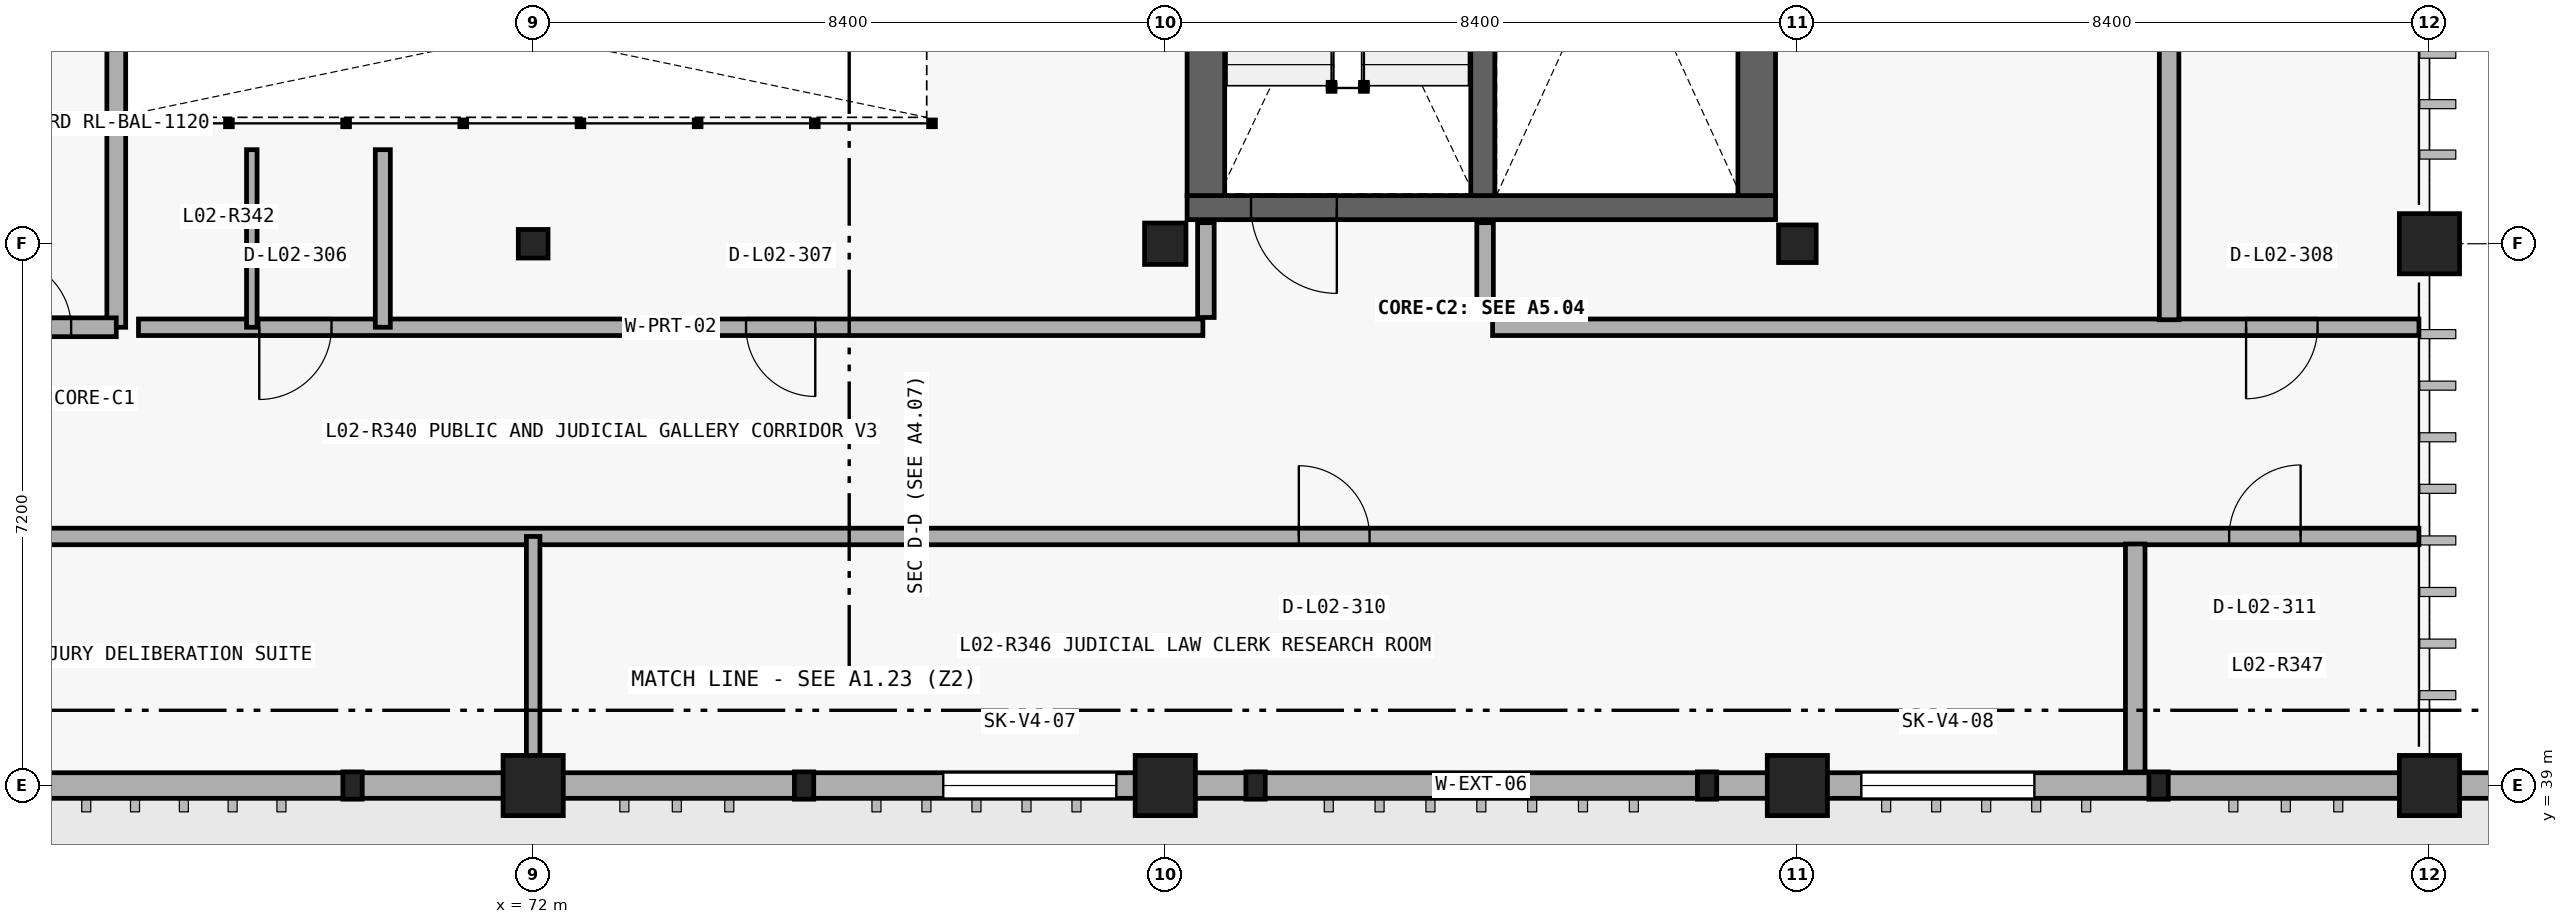
"""IFC4 building model, lengths in metres.
Left out: names, types, materials, properties, quantities, classifications, styles, units other than length and angle.
Written with IfcOpenShell. Run it as: python <this file> out.ifc"""

import sys

from ifc_helpers import new_model, si_unit, direction, frame, frame_2d, origin_with_axes, origin_2d_with_axis, place, context, subcontext, project, spatial, rectangle, circle, i_section, extrude, element, fill, save


model = new_model("IFC4")
c1 = context("Model", 3, precision=1e-05, world=origin_with_axes(), true_north=direction((0.0, 1.0)))
c2 = subcontext(c1, "Body", "Model", "MODEL_VIEW")
j1 = project(units=[si_unit("LENGTHUNIT", "METRE"), si_unit("PLANEANGLEUNIT", "RADIAN")], contexts=[c1])
p1 = place(None, origin_with_axes())
s1 = spatial("IfcSite", under=j1, at=p1, CompositionType="ELEMENT")
p2 = place(p1, origin_with_axes())
s2 = spatial("IfcBuilding", under=s1, at=p2, CompositionType="ELEMENT")
p3 = place(p2, frame((0.0, 0.0, 10.8), z_axis=(0.0, 0.0, 1.0), x_axis=(1.0, 0.0, 0.0)))
s3 = spatial("IfcBuildingStorey", under=s2, at=p3, CompositionType="ELEMENT", Elevation=10.8)
p4 = place(None, frame((64.5, 39.0, 10.48), z_axis=(0.0, 0.0, 1.0), x_axis=(1.0, 0.0, 0.0)))
e1 = element("IfcWall", 1, at=p4, inside=s3, PredefinedType="SOLIDWALL", context=c2, shape_type="SweptSolid", body=[
    extrude(rectangle(XDim=40.2, YDim=0.34, at=frame_2d((20.1, 0.0), x_axis=(1.0, 0.0))), origin_with_axes(), (0.0, 0.0, 1.0), 2.22),
])
p5 = place(None, frame((78.6, 39.0, 11.08), z_axis=(0.0, 0.0, 1.0), x_axis=(1.0, 0.0, 0.0)))
e2 = element("IfcOpeningElement", 2, at=p5, cuts=e1, PredefinedType="OPENING", context=c2, shape_type="SweptSolid", body=[
    extrude(rectangle(XDim=2.3, YDim=1.25, at=frame_2d((0.0, 0.625), x_axis=(1.0, 0.0))), frame((0.0, 0.18, 0.0), z_axis=(0.0, -1.0, 0.0), x_axis=(1.0, 0.0, 0.0)), (0.0, 0.0, 1.0), 0.36),
])
p6 = place(None, frame((90.8, 39.0, 11.08), z_axis=(0.0, 0.0, 1.0), x_axis=(1.0, 0.0, 0.0)))
e3 = element("IfcOpeningElement", 3, at=p6, cuts=e1, PredefinedType="OPENING", context=c2, shape_type="SweptSolid", body=[
    extrude(rectangle(XDim=2.3, YDim=1.25, at=frame_2d((0.0, 0.625), x_axis=(1.0, 0.0))), frame((0.0, 0.18, 0.0), z_axis=(0.0, -1.0, 0.0), x_axis=(1.0, 0.0, 0.0)), (0.0, 0.0, 1.0), 0.36),
])
p7 = place(None, frame((66.46, 45.09, 10.8), z_axis=(0.0, 0.0, 1.0), x_axis=(0.0, 1.0, 0.0)))
e4 = element("IfcWall", 4, at=p7, inside=s3, PredefinedType="PARTITIONING", context=c2, shape_type="SweptSolid", body=[
    extrude(rectangle(XDim=9.03, YDim=0.25, at=frame_2d((4.515, 0.0), x_axis=(1.0, 0.0))), origin_with_axes(), (0.0, 0.0, 1.0), 4.44),
])
p8 = place(None, frame((63.1, 45.09, 10.8), z_axis=(0.0, 0.0, 1.0), x_axis=(1.0, 0.0, 0.0)))
e5 = element("IfcWall", 5, at=p8, inside=s3, PredefinedType="PARTITIONING", context=c2, shape_type="SweptSolid", body=[
    extrude(rectangle(XDim=3.36, YDim=0.25, at=frame_2d((1.68, 0.0), x_axis=(1.0, 0.0))), origin_with_axes(), (0.0, 0.0, 1.0), 4.44),
])
p9 = place(None, frame((65.405, 45.09, 10.8), z_axis=(0.0, 0.0, 1.0), x_axis=(1.0, 0.0, 0.0)))
e6 = element("IfcOpeningElement", 6, at=p9, cuts=e5, PredefinedType="OPENING", context=c2, shape_type="SweptSolid", body=[
    extrude(rectangle(XDim=0.91, YDim=2.12, at=frame_2d((0.0, 1.06), x_axis=(1.0, 0.0))), frame((0.0, 0.135, 0.0), z_axis=(0.0, -1.0, 0.0), x_axis=(1.0, 0.0, 0.0)), (0.0, 0.0, 1.0), 0.27),
])
p10 = place(None, frame((80.69, 46.68, 10.8), z_axis=(0.0, 0.0, 1.0), x_axis=(1.0, 0.0, 0.0)))
e7 = element("IfcWall", 7, at=p10, inside=s3, PredefinedType="SHEAR", context=c2, shape_type="SweptSolid", body=[
    extrude(rectangle(XDim=7.82, YDim=0.32, at=frame_2d((3.91, 0.0), x_axis=(1.0, 0.0))), origin_with_axes(), (0.0, 0.0, 1.0), 4.8),
])
p11 = place(None, frame((82.11, 46.68, 10.8), z_axis=(0.0, 0.0, 1.0), x_axis=(1.0, 0.0, 0.0)))
e8 = element("IfcOpeningElement", 8, at=p11, cuts=e7, PredefinedType="OPENING", context=c2, shape_type="SweptSolid", body=[
    extrude(rectangle(XDim=1.14, YDim=2.18, at=frame_2d((0.0, 1.09), x_axis=(1.0, 0.0))), frame((0.0, 0.17, 0.0), z_axis=(0.0, -1.0, 0.0), x_axis=(1.0, 0.0, 0.0)), (0.0, 0.0, 1.0), 0.34),
])
for number, where, z_axis, x_axis in (
    (9, (88.26, 46.84, 10.8), (0.0, 0.0, 1.0), (0.0, 1.0, 0.0)),
    (10, (80.94, 53.96, 10.8), (0.0, 0.0, 1.0), (0.0, -1.0, 0.0)),
):
    element("IfcWall", number, at=place(None, frame(where, z_axis=z_axis, x_axis=x_axis)), inside=s3, PredefinedType="SHEAR", context=c2, shape_type="SweptSolid", body=[
        extrude(rectangle(XDim=7.12, YDim=0.5, at=frame_2d((3.56, 0.0), x_axis=(1.0, 0.0))), origin_with_axes(), (0.0, 0.0, 1.0), 4.8),
    ])
p12 = place(None, frame((84.62, 46.84, 10.8), z_axis=(0.0, 0.0, 1.0), x_axis=(0.0, 1.0, 0.0)))
e11 = element("IfcWall", 11, at=p12, inside=s3, PredefinedType="SHEAR", context=c2, shape_type="SweptSolid", body=[
    extrude(rectangle(XDim=7.12, YDim=0.32, at=frame_2d((3.56, 0.0), x_axis=(1.0, 0.0))), origin_with_axes(), (0.0, 0.0, 1.0), 4.8),
])
for number, where, z_axis, x_axis in (
    (12, (80.94, 45.22, 10.8), (0.0, 0.0, 1.0), (0.0, 1.0, 0.0)),
    (13, (84.65, 45.22, 10.8), (0.0, 0.0, 1.0), (0.0, 1.0, 0.0)),
):
    element("IfcWall", number, at=place(None, frame(where, z_axis=z_axis, x_axis=x_axis)), inside=s3, PredefinedType="PARTITIONING", context=c2, shape_type="SweptSolid", body=[
        extrude(rectangle(XDim=1.26, YDim=0.22, at=frame_2d((0.63, 0.0), x_axis=(1.0, 0.0))), origin_with_axes(), (0.0, 0.0, 1.0), 4.44),
    ])
p13 = place(None, frame((66.755, 45.09, 10.8), z_axis=(0.0, 0.0, 1.0), x_axis=(1.0, 0.0, 0.0)))
e14 = element("IfcWall", 14, at=p13, inside=s3, PredefinedType="PARTITIONING", context=c2, shape_type="SweptSolid", body=[
    extrude(rectangle(XDim=14.145, YDim=0.22, at=frame_2d((7.072, 0.0), x_axis=(1.0, 0.0))), origin_with_axes(), (0.0, 0.0, 1.0), 4.44),
])
p14 = place(None, frame((68.84, 45.09, 10.8), z_axis=(0.0, 0.0, 1.0), x_axis=(1.0, 0.0, 0.0)))
e15 = element("IfcOpeningElement", 15, at=p14, cuts=e14, PredefinedType="OPENING", context=c2, shape_type="SweptSolid", body=[
    extrude(rectangle(XDim=0.96, YDim=2.2, at=frame_2d((0.0, 1.1), x_axis=(1.0, 0.0))), frame((0.0, 0.12, 0.0), z_axis=(0.0, -1.0, 0.0), x_axis=(1.0, 0.0, 0.0)), (0.0, 0.0, 1.0), 0.24),
])
p15 = place(None, frame((75.289, 45.09, 10.8), z_axis=(0.0, 0.0, 1.0), x_axis=(1.0, 0.0, 0.0)))
e16 = element("IfcOpeningElement", 16, at=p15, cuts=e14, PredefinedType="OPENING", context=c2, shape_type="SweptSolid", body=[
    extrude(rectangle(XDim=0.92, YDim=2.14, at=frame_2d((0.0, 1.07), x_axis=(1.0, 0.0))), frame((0.0, 0.12, 0.0), z_axis=(0.0, -1.0, 0.0), x_axis=(1.0, 0.0, 0.0)), (0.0, 0.0, 1.0), 0.24),
])
p16 = place(None, frame((84.75, 45.09, 10.8), z_axis=(0.0, 0.0, 1.0), x_axis=(1.0, 0.0, 0.0)))
e17 = element("IfcWall", 17, at=p16, inside=s3, PredefinedType="PARTITIONING", context=c2, shape_type="SweptSolid", body=[
    extrude(rectangle(XDim=12.31, YDim=0.22, at=frame_2d((6.155, 0.0), x_axis=(1.0, 0.0))), origin_with_axes(), (0.0, 0.0, 1.0), 4.44),
])
p17 = place(None, frame((95.238, 45.09, 10.8), z_axis=(0.0, 0.0, 1.0), x_axis=(1.0, 0.0, 0.0)))
e18 = element("IfcOpeningElement", 18, at=p17, cuts=e17, PredefinedType="OPENING", context=c2, shape_type="SweptSolid", body=[
    extrude(rectangle(XDim=0.95, YDim=2.1, at=frame_2d((0.0, 1.05), x_axis=(1.0, 0.0))), frame((0.0, 0.12, 0.0), z_axis=(0.0, -1.0, 0.0), x_axis=(1.0, 0.0, 0.0)), (0.0, 0.0, 1.0), 0.24),
])
p18 = place(None, frame((46.956, 42.31, 10.8), z_axis=(0.0, 0.0, 1.0), x_axis=(1.0, 0.0, 0.0)))
e19 = element("IfcWall", 19, at=p18, inside=s3, PredefinedType="PARTITIONING", context=c2, shape_type="SweptSolid", body=[
    extrude(rectangle(XDim=50.104, YDim=0.22, at=frame_2d((25.052, 0.0), x_axis=(1.0, 0.0))), origin_with_axes(), (0.0, 0.0, 1.0), 4.44),
])
p19 = place(None, frame((59.64, 42.31, 10.8), z_axis=(0.0, 0.0, 1.0), x_axis=(1.0, 0.0, 0.0)))
e20 = element("IfcOpeningElement", 20, at=p19, cuts=e19, PredefinedType="OPENING", context=c2, shape_type="SweptSolid", body=[
    extrude(rectangle(XDim=0.99, YDim=2.22, at=frame_2d((0.0, 1.11), x_axis=(1.0, 0.0))), frame((0.0, 0.12, 0.0), z_axis=(0.0, -1.0, 0.0), x_axis=(1.0, 0.0, 0.0)), (0.0, 0.0, 1.0), 0.24),
])
p20 = place(None, frame((82.645, 42.31, 10.8), z_axis=(0.0, 0.0, 1.0), x_axis=(1.0, 0.0, 0.0)))
e21 = element("IfcOpeningElement", 21, at=p20, cuts=e19, PredefinedType="OPENING", context=c2, shape_type="SweptSolid", body=[
    extrude(rectangle(XDim=0.94, YDim=2.3, at=frame_2d((0.0, 1.15), x_axis=(1.0, 0.0))), frame((0.0, 0.12, 0.0), z_axis=(0.0, -1.0, 0.0), x_axis=(1.0, 0.0, 0.0)), (0.0, 0.0, 1.0), 0.24),
])
p21 = place(None, frame((95.013, 42.31, 10.8), z_axis=(0.0, 0.0, 1.0), x_axis=(1.0, 0.0, 0.0)))
e22 = element("IfcOpeningElement", 22, at=p21, cuts=e19, PredefinedType="OPENING", context=c2, shape_type="SweptSolid", body=[
    extrude(rectangle(XDim=0.95, YDim=2.1, at=frame_2d((0.0, 1.05), x_axis=(1.0, 0.0))), frame((0.0, 0.12, 0.0), z_axis=(0.0, -1.0, 0.0), x_axis=(1.0, 0.0, 0.0)), (0.0, 0.0, 1.0), 0.24),
])
p22 = place(None, frame((93.74, 45.19, 10.8), z_axis=(0.0, 0.0, 1.0), x_axis=(0.0, 1.0, 0.0)))
e23 = element("IfcWall", 23, at=p22, inside=s3, PredefinedType="PLUMBINGWALL", context=c2, shape_type="SweptSolid", body=[
    extrude(rectangle(XDim=16.43, YDim=0.26, at=frame_2d((8.215, 0.0), x_axis=(1.0, 0.0))), origin_with_axes(), (0.0, 0.0, 1.0), 4.44),
])
p23 = place(None, frame((93.29, 39.18, 10.8), z_axis=(0.0, 0.0, 1.0), x_axis=(0.0, 1.0, 0.0)))
e24 = element("IfcWall", 24, at=p23, inside=s3, PredefinedType="PLUMBINGWALL", context=c2, shape_type="SweptSolid", body=[
    extrude(rectangle(XDim=3.03, YDim=0.26, at=frame_2d((1.515, 0.0), x_axis=(1.0, 0.0))), origin_with_axes(), (0.0, 0.0, 1.0), 4.44),
])
p24 = place(None, frame((68.261, 45.09, 10.8), z_axis=(0.0, 0.0, 1.0), x_axis=(0.0, 1.0, 0.0)))
e25 = element("IfcWall", 25, at=p24, inside=s3, PredefinedType="PARTITIONING", context=c2, shape_type="SweptSolid", body=[
    extrude(rectangle(XDim=2.36, YDim=0.14, at=frame_2d((1.18, 0.0), x_axis=(1.0, 0.0))), origin_with_axes(), (0.0, 0.0, 1.0), 4.44),
])
p25 = place(None, frame((70.002, 45.09, 10.8), z_axis=(0.0, 0.0, 1.0), x_axis=(0.0, 1.0, 0.0)))
e26 = element("IfcWall", 26, at=p25, inside=s3, PredefinedType="PARTITIONING", context=c2, shape_type="SweptSolid", body=[
    extrude(rectangle(XDim=2.36, YDim=0.2, at=frame_2d((1.18, 0.0), x_axis=(1.0, 0.0))), origin_with_axes(), (0.0, 0.0, 1.0), 4.44),
])
p26 = place(None, frame((72.0, 39.14, 10.8), z_axis=(0.0, 0.0, 1.0), x_axis=(0.0, 1.0, 0.0)))
e27 = element("IfcWall", 27, at=p26, inside=s3, PredefinedType="PARTITIONING", context=c2, shape_type="SweptSolid", body=[
    extrude(rectangle(XDim=3.17, YDim=0.18, at=frame_2d((1.585, 0.0), x_axis=(1.0, 0.0))), origin_with_axes(), (0.0, 0.0, 1.0), 3.664),
])
p27 = place(None, frame((72.0, 39.0, 10.8), z_axis=(0.0, 0.0, 1.0), x_axis=(1.0, 0.0, 0.0)))
e28 = element("IfcColumn", 28, at=p27, inside=s3, PredefinedType="COLUMN", context=c2, shape_type="SweptSolid", body=[
    extrude(circle(Radius=0.4, at=origin_2d_with_axis()), origin_with_axes(), (0.0, 0.0, 1.0), 4.8),
])
p28 = place(None, frame((72.0, 46.2, 10.8), z_axis=(0.0, 0.0, 1.0), x_axis=(1.0, 0.0, 0.0)))
e29 = element("IfcColumn", 29, at=p28, inside=s3, PredefinedType="COLUMN", context=c2, shape_type="SweptSolid", body=[
    extrude(i_section(OverallWidth=0.395, OverallDepth=0.38, WebThickness=0.019, FlangeThickness=0.03, at=origin_2d_with_axis()), origin_with_axes(), (0.0, 0.0, 1.0), 4.8),
])
p29 = place(None, frame((80.4, 39.0, 10.8), z_axis=(0.0, 0.0, 1.0), x_axis=(1.0, 0.0, 0.0)))
e30 = element("IfcColumn", 30, at=p29, inside=s3, PredefinedType="COLUMN", context=c2, shape_type="SweptSolid", body=[
    extrude(circle(Radius=0.4, at=origin_2d_with_axis()), origin_with_axes(), (0.0, 0.0, 1.0), 4.8),
])
p30 = place(None, frame((80.4, 46.2, 10.8), z_axis=(0.0, 0.0, 1.0), x_axis=(1.0, 0.0, 0.0)))
e31 = element("IfcColumn", 31, at=p30, inside=s3, PredefinedType="COLUMN", context=c2, shape_type="SweptSolid", body=[
    extrude(i_section(OverallWidth=0.55, OverallDepth=0.55, WebThickness=0.025, FlangeThickness=0.042, at=origin_2d_with_axis()), origin_with_axes(), (0.0, 0.0, 1.0), 4.8),
])
p31 = place(None, frame((88.8, 39.0, 10.8), z_axis=(0.0, 0.0, 1.0), x_axis=(1.0, 0.0, 0.0)))
e32 = element("IfcColumn", 32, at=p31, inside=s3, PredefinedType="COLUMN", context=c2, shape_type="SweptSolid", body=[
    extrude(circle(Radius=0.4, at=origin_2d_with_axis()), origin_with_axes(), (0.0, 0.0, 1.0), 4.8),
])
p32 = place(None, frame((88.8, 46.2, 10.8), z_axis=(0.0, 0.0, 1.0), x_axis=(1.0, 0.0, 0.0)))
e33 = element("IfcColumn", 33, at=p32, inside=s3, PredefinedType="COLUMN", context=c2, shape_type="SweptSolid", body=[
    extrude(i_section(OverallWidth=0.5, OverallDepth=0.5, WebThickness=0.022, FlangeThickness=0.036, at=origin_2d_with_axis()), origin_with_axes(), (0.0, 0.0, 1.0), 4.8),
])
for number, where, z_axis, x_axis in (
    (34, (97.2, 39.0, 10.8), (0.0, 0.0, 1.0), (1.0, 0.0, 0.0)),
    (35, (97.2, 46.2, 10.8), (0.0, 0.0, 1.0), (1.0, 0.0, 0.0)),
):
    element("IfcColumn", number, at=place(None, frame(where, z_axis=z_axis, x_axis=x_axis)), inside=s3, PredefinedType="COLUMN", context=c2, shape_type="SweptSolid", body=[
        extrude(circle(Radius=0.4, at=origin_2d_with_axis()), origin_with_axes(), (0.0, 0.0, 1.0), 4.8),
    ])
p33 = place(None, frame((69.6, 39.0, 10.48), z_axis=(0.0, 0.0, 1.0), x_axis=(1.0, 0.0, 0.0)))
e36 = element("IfcColumn", 36, at=p33, inside=s3, PredefinedType="COLUMN", context=c2, shape_type="SweptSolid", body=[
    extrude(i_section(OverallWidth=0.257, OverallDepth=0.363, WebThickness=0.013, FlangeThickness=0.022, at=origin_2d_with_axis()), origin_with_axes(), (0.0, 0.0, 1.0), 2.02),
])
for number, where, z_axis, x_axis in (
    (37, (75.6, 39.0, 10.56), (0.0, 0.0, 1.0), (1.0, 0.0, 0.0)),
    (38, (81.6, 39.0, 10.56), (0.0, 0.0, 1.0), (1.0, 0.0, 0.0)),
    (39, (87.6, 39.0, 10.56), (0.0, 0.0, 1.0), (1.0, 0.0, 0.0)),
    (40, (93.6, 39.0, 10.56), (0.0, 0.0, 1.0), (1.0, 0.0, 0.0)),
):
    element("IfcColumn", number, at=place(None, frame(where, z_axis=z_axis, x_axis=x_axis)), inside=s3, PredefinedType="COLUMN", context=c2, shape_type="SweptSolid", body=[
        extrude(i_section(OverallWidth=0.257, OverallDepth=0.363, WebThickness=0.013, FlangeThickness=0.022, at=origin_2d_with_axis()), origin_with_axes(), (0.0, 0.0, 1.0), 1.94),
    ])
p34 = place(None, frame((65.405, 45.09, 10.8), z_axis=(0.0, 0.0, 1.0), x_axis=(1.0, 0.0, 0.0)))
e41 = element("IfcDoor", 41, at=p34, inside=s3, OperationType="SINGLE_SWING_LEFT", PredefinedType="DOOR", context=c2, shape_type="SweptSolid", body=[
    extrude(rectangle(XDim=0.91, YDim=2.12, at=frame_2d((0.0, 1.06), x_axis=(1.0, 0.0))), frame((0.0, 0.04, 0.0), z_axis=(0.0, -1.0, 0.0), x_axis=(1.0, 0.0, 0.0)), (0.0, 0.0, 1.0), 0.08),
])
fill(e6, e41)
p35 = place(None, frame((82.11, 46.68, 10.8), z_axis=(0.0, 0.0, 1.0), x_axis=(-1.0, 0.0, 0.0)))
e42 = element("IfcDoor", 42, at=p35, inside=s3, OperationType="SINGLE_SWING_RIGHT", PredefinedType="DOOR", context=c2, shape_type="SweptSolid", body=[
    extrude(rectangle(XDim=1.14, YDim=2.18, at=frame_2d((0.0, 1.09), x_axis=(1.0, 0.0))), frame((0.0, 0.04, 0.0), z_axis=(0.0, -1.0, 0.0), x_axis=(1.0, 0.0, 0.0)), (0.0, 0.0, 1.0), 0.08),
])
fill(e8, e42)
p36 = place(None, frame((68.84, 45.09, 10.8), z_axis=(0.0, 0.0, 1.0), x_axis=(-1.0, 0.0, 0.0)))
e43 = element("IfcDoor", 43, at=p36, inside=s3, OperationType="SINGLE_SWING_LEFT", PredefinedType="DOOR", context=c2, shape_type="SweptSolid", body=[
    extrude(rectangle(XDim=0.96, YDim=2.2, at=frame_2d((0.0, 1.1), x_axis=(1.0, 0.0))), frame((0.0, 0.04, 0.0), z_axis=(0.0, -1.0, 0.0), x_axis=(1.0, 0.0, 0.0)), (0.0, 0.0, 1.0), 0.08),
])
fill(e15, e43)
p37 = place(None, frame((75.289, 45.09, 10.8), z_axis=(0.0, 0.0, 1.0), x_axis=(-1.0, 0.0, 0.0)))
e44 = element("IfcDoor", 44, at=p37, inside=s3, OperationType="SINGLE_SWING_RIGHT", PredefinedType="DOOR", context=c2, shape_type="SweptSolid", body=[
    extrude(rectangle(XDim=0.92, YDim=2.14, at=frame_2d((0.0, 1.07), x_axis=(1.0, 0.0))), frame((0.0, 0.04, 0.0), z_axis=(0.0, -1.0, 0.0), x_axis=(1.0, 0.0, 0.0)), (0.0, 0.0, 1.0), 0.08),
])
fill(e16, e44)
p38 = place(None, frame((95.238, 45.09, 10.8), z_axis=(0.0, 0.0, 1.0), x_axis=(-1.0, 0.0, 0.0)))
e45 = element("IfcDoor", 45, at=p38, inside=s3, OperationType="SINGLE_SWING_LEFT", PredefinedType="DOOR", context=c2, shape_type="SweptSolid", body=[
    extrude(rectangle(XDim=0.95, YDim=2.1, at=frame_2d((0.0, 1.05), x_axis=(1.0, 0.0))), frame((0.0, 0.04, 0.0), z_axis=(0.0, -1.0, 0.0), x_axis=(1.0, 0.0, 0.0)), (0.0, 0.0, 1.0), 0.08),
])
fill(e18, e45)
p39 = place(None, frame((82.645, 42.31, 10.8), z_axis=(0.0, 0.0, 1.0), x_axis=(1.0, 0.0, 0.0)))
e46 = element("IfcDoor", 46, at=p39, inside=s3, OperationType="SINGLE_SWING_LEFT", PredefinedType="DOOR", context=c2, shape_type="SweptSolid", body=[
    extrude(rectangle(XDim=0.94, YDim=2.3, at=frame_2d((0.0, 1.15), x_axis=(1.0, 0.0))), frame((0.0, 0.04, 0.0), z_axis=(0.0, -1.0, 0.0), x_axis=(1.0, 0.0, 0.0)), (0.0, 0.0, 1.0), 0.08),
])
fill(e21, e46)
p40 = place(None, frame((95.013, 42.31, 10.8), z_axis=(0.0, 0.0, 1.0), x_axis=(1.0, 0.0, 0.0)))
e47 = element("IfcDoor", 47, at=p40, inside=s3, OperationType="SINGLE_SWING_RIGHT", PredefinedType="DOOR", context=c2, shape_type="SweptSolid", body=[
    extrude(rectangle(XDim=0.95, YDim=2.1, at=frame_2d((0.0, 1.05), x_axis=(1.0, 0.0))), frame((0.0, 0.04, 0.0), z_axis=(0.0, -1.0, 0.0), x_axis=(1.0, 0.0, 0.0)), (0.0, 0.0, 1.0), 0.08),
])
fill(e22, e47)
p41 = place(None, frame((78.6, 39.0, 11.08), z_axis=(0.0, 0.0, 1.0), x_axis=(1.0, 0.0, 0.0)))
e48 = element("IfcWindow", 48, at=p41, inside=s3, PartitioningType="SINGLE_PANEL", PredefinedType="SKYLIGHT", context=c2, shape_type="SweptSolid", body=[
    extrude(rectangle(XDim=2.3, YDim=1.25, at=frame_2d((0.0, 0.625), x_axis=(1.0, 0.0))), frame((0.0, 0.03, 0.0), z_axis=(0.0, -1.0, 0.0), x_axis=(1.0, 0.0, 0.0)), (0.0, 0.0, 1.0), 0.06),
])
fill(e2, e48)
p42 = place(None, frame((90.8, 39.0, 11.08), z_axis=(0.0, 0.0, 1.0), x_axis=(1.0, 0.0, 0.0)))
e49 = element("IfcWindow", 49, at=p42, inside=s3, PartitioningType="SINGLE_PANEL", PredefinedType="SKYLIGHT", context=c2, shape_type="SweptSolid", body=[
    extrude(rectangle(XDim=2.3, YDim=1.25, at=frame_2d((0.0, 0.625), x_axis=(1.0, 0.0))), frame((0.0, 0.03, 0.0), z_axis=(0.0, -1.0, 0.0), x_axis=(1.0, 0.0, 0.0)), (0.0, 0.0, 1.0), 0.06),
])
fill(e3, e49)
save(model, sys.argv[1])
